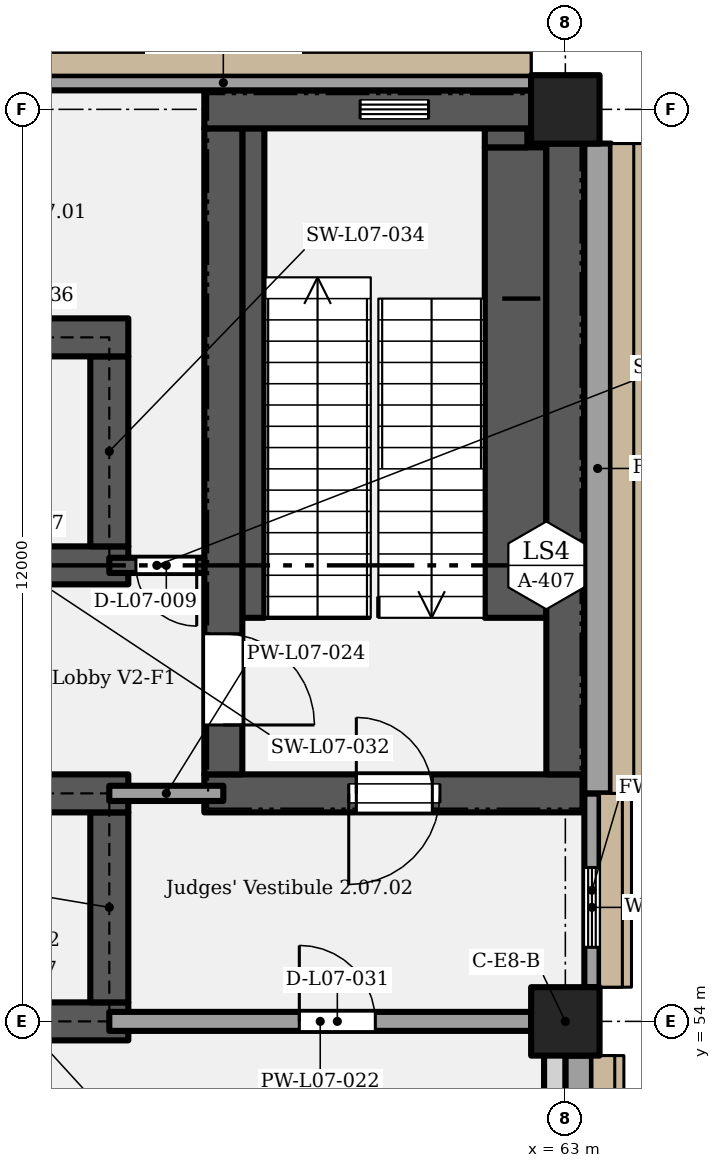
"""IFC4 building model, lengths in metres.
Left out: names, types, materials, properties, quantities, classifications, styles, units other than length and angle.
Written with IfcOpenShell. Run it as: python <this file> out.ifc"""

import sys

from ifc_helpers import new_model, si_unit, direction, frame, frame_2d, origin, origin_2d, place, context, subcontext, project, spatial, rectangle, extrude, element, fill, save


model = new_model("IFC4")
c1 = context("Model", 3, precision=1e-05, world=origin(), true_north=direction((0.0, 1.0)))
c2 = subcontext(c1, "Body", "Model", "MODEL_VIEW")
j1 = project(units=[si_unit("LENGTHUNIT", "METRE"), si_unit("PLANEANGLEUNIT", "RADIAN")], contexts=[c1])
p1 = place(None, origin())
s1 = spatial("IfcSite", under=j1, at=p1, CompositionType="ELEMENT")
p2 = place(p1, origin())
s2 = spatial("IfcBuilding", under=s1, at=p2, CompositionType="ELEMENT")
p3 = place(p2, frame((0.0, 0.0, 39.0)))
s3 = spatial("IfcBuildingStorey", under=s2, at=p3, CompositionType="ELEMENT", Elevation=39.0)
for number, where, z_axis, x_axis in (
    (1, (63.0, 54.0, 0.0), (0.0, 0.0, 1.0), (1.0, 0.0, 0.0)),
    (2, (63.0, 66.0, 0.0), (0.0, 0.0, 1.0), (1.0, 0.0, 0.0)),
):
    element("IfcColumn", number, at=place(p3, frame(where, z_axis=z_axis, x_axis=x_axis)), inside=s3, PredefinedType="COLUMN", context=c2, shape_type="SweptSolid", body=[
        extrude(rectangle(XDim=0.9, YDim=0.9, at=origin_2d()), origin(), (0.0, 0.0, 1.0), 5.4),
    ])
p4 = place(p3, frame((54.45, 54.0, 0.0), z_axis=(0.0, 0.0, 1.0), x_axis=(1.0, 0.0, 0.0)))
e3 = element("IfcWall", 3, at=p4, inside=s3, PredefinedType="SHEAR", context=c2, shape_type="SweptSolid", body=[
    extrude(rectangle(XDim=2.8, YDim=0.5, at=frame_2d((1.4, 0.0))), origin(), (0.0, 0.0, 1.0), 5.15),
])
p5 = place(p3, frame((57.0, 54.25, 0.0), z_axis=(0.0, 0.0, 1.0), x_axis=(0.0, 1.0, 0.0)))
e4 = element("IfcWall", 4, at=p5, inside=s3, PredefinedType="SHEAR", context=c2, shape_type="SweptSolid", body=[
    extrude(rectangle(XDim=2.5, YDim=0.5, at=frame_2d((1.25, 0.0))), origin(), (0.0, 0.0, 1.0), 5.15),
])
p6 = place(p3, frame((46.25, 57.0, 0.0), z_axis=(0.0, 0.0, 1.0), x_axis=(1.0, 0.0, 0.0)))
e5 = element("IfcWall", 5, at=p6, inside=s3, PredefinedType="SHEAR", context=c2, shape_type="SweptSolid", body=[
    extrude(rectangle(XDim=11.0, YDim=0.5, at=frame_2d((5.5, 0.0))), origin(), (0.0, 0.0, 1.0), 5.15),
])
p7 = place(p6, frame((4.9, 0.0, 0.0)))
e6 = element("IfcOpeningElement", 6, at=p7, cuts=e5, PredefinedType="OPENING", context=c2, shape_type="SweptSolid", body=[
    extrude(rectangle(XDim=1.2, YDim=2.1, at=frame_2d((0.6, 1.05))), frame((0.0, 0.26, 0.0), z_axis=(0.0, -1.0, 0.0), x_axis=(1.0, 0.0, 0.0)), (0.0, 0.0, 1.0), 0.52),
])
p8 = place(p3, frame((58.25, 57.0, 0.0), z_axis=(0.0, 0.0, 1.0), x_axis=(1.0, 0.0, 0.0)))
e7 = element("IfcWall", 7, at=p8, inside=s3, PredefinedType="SHEAR", context=c2, shape_type="SweptSolid", body=[
    extrude(rectangle(XDim=5.0, YDim=0.5, at=frame_2d((2.5, 0.0))), origin(), (0.0, 0.0, 1.0), 5.15),
])
p9 = place(p8, frame((2.0, 0.0, 0.0)))
e8 = element("IfcOpeningElement", 8, at=p9, cuts=e7, PredefinedType="OPENING", context=c2, shape_type="SweptSolid", body=[
    extrude(rectangle(XDim=1.0, YDim=2.1, at=frame_2d((0.5, 1.05))), frame((0.0, 0.26, 0.0), z_axis=(0.0, -1.0, 0.0), x_axis=(1.0, 0.0, 0.0)), (0.0, 0.0, 1.0), 0.52),
])
p10 = place(p3, frame((58.5, 57.25, 0.0), z_axis=(0.0, 0.0, 1.0), x_axis=(0.0, 1.0, 0.0)))
e9 = element("IfcWall", 9, at=p10, inside=s3, PredefinedType="SHEAR", context=c2, shape_type="SweptSolid", body=[
    extrude(rectangle(XDim=8.5, YDim=0.5, at=frame_2d((4.25, 0.0))), origin(), (0.0, 0.0, 1.0), 5.15),
])
p11 = place(p10, frame((1.85, 0.0, 0.0), z_axis=(0.0, 0.0, 1.0), x_axis=(-1.0, 0.0, 0.0)))
e10 = element("IfcOpeningElement", 10, at=p11, cuts=e9, PredefinedType="OPENING", context=c2, shape_type="SweptSolid", body=[
    extrude(rectangle(XDim=1.2, YDim=2.1, at=frame_2d((0.6, 1.05))), frame((0.0, 0.26, 0.0), z_axis=(0.0, -1.0, 0.0), x_axis=(1.0, 0.0, 0.0)), (0.0, 0.0, 1.0), 0.52),
])
p12 = place(p3, frame((63.0, 57.25, 0.0), z_axis=(0.0, 0.0, 1.0), x_axis=(0.0, 1.0, 0.0)))
e11 = element("IfcWall", 11, at=p12, inside=s3, PredefinedType="SHEAR", context=c2, shape_type="SweptSolid", body=[
    extrude(rectangle(XDim=8.3, YDim=0.5, at=frame_2d((4.15, 0.0))), origin(), (0.0, 0.0, 1.0), 5.15),
])
p13 = place(p3, frame((54.25, 60.0, 0.0), z_axis=(0.0, 0.0, 1.0), x_axis=(1.0, 0.0, 0.0)))
e12 = element("IfcWall", 12, at=p13, inside=s3, PredefinedType="SHEAR", context=c2, shape_type="SweptSolid", body=[
    extrude(rectangle(XDim=3.0, YDim=0.5, at=frame_2d((1.5, 0.0))), origin(), (0.0, 0.0, 1.0), 5.15),
])
p14 = place(p13, frame((0.7, 0.0, 0.0)))
e13 = element("IfcOpeningElement", 13, at=p14, cuts=e12, PredefinedType="OPENING", context=c2, shape_type="SweptSolid", body=[
    extrude(rectangle(XDim=1.1, YDim=2.1, at=frame_2d((0.55, 1.05))), frame((0.0, 0.26, 0.0), z_axis=(0.0, -1.0, 0.0), x_axis=(1.0, 0.0, 0.0)), (0.0, 0.0, 1.0), 0.52),
])
p15 = place(p3, frame((57.0, 60.25, 0.0), z_axis=(0.0, 0.0, 1.0), x_axis=(0.0, 1.0, 0.0)))
e14 = element("IfcWall", 14, at=p15, inside=s3, PredefinedType="SHEAR", context=c2, shape_type="SweptSolid", body=[
    extrude(rectangle(XDim=2.5, YDim=0.5, at=frame_2d((1.25, 0.0))), origin(), (0.0, 0.0, 1.0), 5.15),
])
p16 = place(p3, frame((54.25, 63.0, 0.0), z_axis=(0.0, 0.0, 1.0), x_axis=(1.0, 0.0, 0.0)))
e15 = element("IfcWall", 15, at=p16, inside=s3, PredefinedType="SHEAR", context=c2, shape_type="SweptSolid", body=[
    extrude(rectangle(XDim=3.0, YDim=0.5, at=frame_2d((1.5, 0.0))), origin(), (0.0, 0.0, 1.0), 5.15),
])
p17 = place(p3, frame((58.25, 66.0, 0.0), z_axis=(0.0, 0.0, 1.0), x_axis=(1.0, 0.0, 0.0)))
e16 = element("IfcWall", 16, at=p17, inside=s3, PredefinedType="SHEAR", context=c2, shape_type="SweptSolid", body=[
    extrude(rectangle(XDim=4.3, YDim=0.5, at=frame_2d((2.15, 0.0))), origin(), (0.0, 0.0, 1.0), 5.15),
])
p18 = place(p3, frame((54.45, 66.35, 0.0), z_axis=(0.0, 0.0, 1.0), x_axis=(1.0, 0.0, 0.0)))
e17 = element("IfcWall", 17, at=p18, inside=s3, PredefinedType="SOLIDWALL", context=c2, shape_type="SweptSolid", body=[
    extrude(rectangle(XDim=8.1, YDim=0.2, at=frame_2d((4.05, 0.0))), origin(), (0.0, 0.0, 1.0), 5.15),
])
p19 = place(p3, frame((63.175, 43.5, 0.0), z_axis=(0.0, 0.0, 1.0), x_axis=(0.0, 1.0, 0.0)))
e18 = element("IfcWall", 18, at=p19, inside=s3, PredefinedType="SOLIDWALL", context=c2, shape_type="SweptSolid", body=[
    extrude(rectangle(XDim=10.05, YDim=0.35, at=frame_2d((5.025, 0.0))), origin(), (0.0, 0.0, 1.0), 5.15),
])
p20 = place(p19, frame((1.575, 0.0, 1.2)))
e19 = element("IfcOpeningElement", 19, at=p20, cuts=e18, PredefinedType="OPENING", context=c2, shape_type="SweptSolid", body=[
    extrude(rectangle(XDim=1.35, YDim=3.0, at=frame_2d((0.675, 1.5))), frame((0.0, 0.185, 0.0), z_axis=(0.0, -1.0, 0.0), x_axis=(1.0, 0.0, 0.0)), (0.0, 0.0, 1.0), 0.37),
])
p21 = place(p19, frame((4.875, 0.0, 1.2)))
e20 = element("IfcOpeningElement", 20, at=p21, cuts=e18, PredefinedType="OPENING", context=c2, shape_type="SweptSolid", body=[
    extrude(rectangle(XDim=1.35, YDim=3.0, at=frame_2d((0.675, 1.5))), frame((0.0, 0.185, 0.0), z_axis=(0.0, -1.0, 0.0), x_axis=(1.0, 0.0, 0.0)), (0.0, 0.0, 1.0), 0.37),
])
p22 = place(p19, frame((8.175, 0.0, 1.2)))
e21 = element("IfcOpeningElement", 21, at=p22, cuts=e18, PredefinedType="OPENING", context=c2, shape_type="SweptSolid", body=[
    extrude(rectangle(XDim=1.35, YDim=3.0, at=frame_2d((0.675, 1.5))), frame((0.0, 0.185, 0.0), z_axis=(0.0, -1.0, 0.0), x_axis=(1.0, 0.0, 0.0)), (0.0, 0.0, 1.0), 0.37),
])
p23 = place(p3, frame((63.35, 54.45, 0.0), z_axis=(0.0, 0.0, 1.0), x_axis=(0.0, 1.0, 0.0)))
e22 = element("IfcWall", 22, at=p23, inside=s3, PredefinedType="SOLIDWALL", context=c2, shape_type="SweptSolid", body=[
    extrude(rectangle(XDim=2.55, YDim=0.2, at=frame_2d((1.275, 0.0))), origin(), (0.0, 0.0, 1.0), 5.15),
])
p24 = place(p23, frame((0.525, 0.0, 1.05)))
e23 = element("IfcOpeningElement", 23, at=p24, cuts=e22, PredefinedType="OPENING", context=c2, shape_type="SweptSolid", body=[
    extrude(rectangle(XDim=1.05, YDim=2.4, at=frame_2d((0.525, 1.2))), frame((0.0, 0.11, 0.0), z_axis=(0.0, -1.0, 0.0), x_axis=(1.0, 0.0, 0.0)), (0.0, 0.0, 1.0), 0.22),
])
p25 = place(p3, frame((63.425, 57.0, 0.0), z_axis=(0.0, 0.0, 1.0), x_axis=(0.0, 1.0, 0.0)))
e24 = element("IfcWall", 24, at=p25, inside=s3, PredefinedType="SOLIDWALL", context=c2, shape_type="SweptSolid", body=[
    extrude(rectangle(XDim=8.55, YDim=0.35, at=frame_2d((4.275, 0.0))), origin(), (0.0, 0.0, 1.0), 5.15),
])
p26 = place(p3, frame((62.86, 49.14, 5.4), z_axis=(0.0, 0.0, 1.0), x_axis=(0.0, 1.0, 0.0)))
e25 = element("IfcWall", 25, at=p26, inside=s3, PredefinedType="PARAPET", context=c2, shape_type="SweptSolid", body=[
    extrude(rectangle(XDim=5.22, YDim=0.28, at=frame_2d((2.61, 0.0))), origin(), (0.0, 0.0, 1.0), 1.6),
])
p27 = place(p3, frame((58.375, 57.0, 5.4), z_axis=(0.0, 0.0, 1.0), x_axis=(1.0, 0.0, 0.0)))
e26 = element("IfcWall", 26, at=p27, inside=s3, PredefinedType="SOLIDWALL", context=c2, shape_type="SweptSolid", body=[
    extrude(rectangle(XDim=4.75, YDim=0.25, at=frame_2d((2.375, 0.0))), origin(), (0.0, 0.0, 1.0), 3.1),
])
p28 = place(p27, frame((2.975, 0.0, 0.0), z_axis=(0.0, 0.0, 1.0), x_axis=(-1.0, 0.0, 0.0)))
e27 = element("IfcOpeningElement", 27, at=p28, cuts=e26, PredefinedType="OPENING", context=c2, shape_type="SweptSolid", body=[
    extrude(rectangle(XDim=1.2, YDim=2.1, at=frame_2d((0.6, 1.05))), frame((0.0, 0.135, 0.0), z_axis=(0.0, -1.0, 0.0), x_axis=(1.0, 0.0, 0.0)), (0.0, 0.0, 1.0), 0.27),
])
p29 = place(p3, frame((58.375, 66.0, 5.4), z_axis=(0.0, 0.0, 1.0), x_axis=(1.0, 0.0, 0.0)))
e28 = element("IfcWall", 28, at=p29, inside=s3, PredefinedType="SOLIDWALL", context=c2, shape_type="SweptSolid", body=[
    extrude(rectangle(XDim=4.75, YDim=0.25, at=frame_2d((2.375, 0.0))), origin(), (0.0, 0.0, 1.0), 3.1),
])
p30 = place(p29, frame((1.925, 0.0, 2.4)))
e29 = element("IfcOpeningElement", 29, at=p30, cuts=e28, PredefinedType="OPENING", context=c2, shape_type="SweptSolid", body=[
    extrude(rectangle(XDim=0.9, YDim=0.6, at=frame_2d((0.45, 0.3))), frame((0.0, 0.135, 0.0), z_axis=(0.0, -1.0, 0.0), x_axis=(1.0, 0.0, 0.0)), (0.0, 0.0, 1.0), 0.27),
])
for number, where, z_axis, x_axis in (
    (30, (58.5, 57.125, 5.4), (0.0, 0.0, 1.0), (0.0, 1.0, 0.0)),
    (31, (63.0, 57.125, 5.4), (0.0, 0.0, 1.0), (0.0, 1.0, 0.0)),
):
    element("IfcWall", number, at=place(p3, frame(where, z_axis=z_axis, x_axis=x_axis)), inside=s3, PredefinedType="SOLIDWALL", context=c2, shape_type="SweptSolid", body=[
        extrude(rectangle(XDim=8.75, YDim=0.25, at=frame_2d((4.375, 0.0))), origin(), (0.0, 0.0, 1.0), 3.1),
    ])
p31 = place(p3, frame((57.0, 54.0, 0.0), z_axis=(0.0, 0.0, 1.0), x_axis=(1.0, 0.0, 0.0)))
e32 = element("IfcWall", 32, at=p31, inside=s3, PredefinedType="PARTITIONING", context=c2, shape_type="SweptSolid", body=[
    extrude(rectangle(XDim=5.55, YDim=0.25, at=frame_2d((2.775, 0.0))), origin(), (0.0, 0.0, 1.0), 4.4),
])
p32 = place(p31, frame((2.5, 0.0, 0.0)))
e33 = element("IfcOpeningElement", 33, at=p32, cuts=e32, PredefinedType="OPENING", context=c2, shape_type="SweptSolid", body=[
    extrude(rectangle(XDim=1.0, YDim=2.1, at=frame_2d((0.5, 1.05))), frame((0.0, 0.135, 0.0), z_axis=(0.0, -1.0, 0.0), x_axis=(1.0, 0.0, 0.0)), (0.0, 0.0, 1.0), 0.27),
])
p33 = place(p3, frame((57.0, 57.0, 0.0), z_axis=(0.0, 0.0, 1.0), x_axis=(1.0, 0.0, 0.0)))
e34 = element("IfcWall", 34, at=p33, inside=s3, PredefinedType="PARTITIONING", context=c2, shape_type="SweptSolid", body=[
    extrude(rectangle(XDim=1.5, YDim=0.2, at=frame_2d((0.75, 0.0))), origin(), (0.0, 0.0, 1.0), 5.15),
])
p34 = place(p3, frame((57.0, 60.0, 0.0), z_axis=(0.0, 0.0, 1.0), x_axis=(1.0, 0.0, 0.0)))
e35 = element("IfcWall", 35, at=p34, inside=s3, PredefinedType="SHEAR", context=c2, shape_type="SweptSolid", body=[
    extrude(rectangle(XDim=1.25, YDim=0.2, at=frame_2d((0.625, 0.0))), origin(), (0.0, 0.0, 1.0), 5.15),
])
p35 = place(p34, frame((1.15, 0.0, 0.0), z_axis=(0.0, 0.0, 1.0), x_axis=(-1.0, 0.0, 0.0)))
e36 = element("IfcOpeningElement", 36, at=p35, cuts=e35, PredefinedType="OPENING", context=c2, shape_type="SweptSolid", body=[
    extrude(rectangle(XDim=0.8, YDim=2.0, at=frame_2d((0.4, 1.0))), frame((0.0, 0.11, 0.0), z_axis=(0.0, -1.0, 0.0), x_axis=(1.0, 0.0, 0.0)), (0.0, 0.0, 1.0), 0.22),
])
p36 = place(p3, frame((58.895, 59.31, 0.0), z_axis=(0.0, 0.0, 1.0), x_axis=(0.0, 1.0, 0.0)))
e37 = element("IfcWall", 37, at=p36, inside=s3, PredefinedType="SHEAR", context=c2, shape_type="SweptSolid", body=[
    extrude(rectangle(XDim=6.44, YDim=0.29, at=frame_2d((3.22, 0.0))), origin(), (0.0, 0.0, 1.0), 2.587),
])
p37 = place(p3, frame((62.345, 59.31, 0.0), z_axis=(0.0, 0.0, 1.0), x_axis=(0.0, 1.0, 0.0)))
e38 = element("IfcWall", 38, at=p37, inside=s3, PredefinedType="SHEAR", context=c2, shape_type="SweptSolid", body=[
    extrude(rectangle(XDim=6.19, YDim=0.81, at=frame_2d((3.095, 0.0))), origin(), (0.0, 0.0, 1.0), 2.587),
])
p38 = place(p3, frame((62.22, 65.5, 0.0), z_axis=(0.0, 0.0, 1.0), x_axis=(0.0, 1.0, 0.0)))
e39 = element("IfcWall", 39, at=p38, inside=s3, PredefinedType="SHEAR", context=c2, shape_type="SweptSolid", body=[
    extrude(rectangle(XDim=0.25, YDim=0.56, at=frame_2d((0.125, 0.0))), origin(), (0.0, 0.0, 1.0), 2.587),
])
p39 = place(p24, origin())
e40 = element("IfcWindow", 40, at=p39, inside=s3, PartitioningType="SINGLE_PANEL", PredefinedType="WINDOW", context=c2, shape_type="SweptSolid", body=[
    extrude(rectangle(XDim=1.05, YDim=2.4, at=frame_2d((0.525, 1.2))), frame((0.0, 0.03, 0.0), z_axis=(0.0, -1.0, 0.0), x_axis=(1.0, 0.0, 0.0)), (0.0, 0.0, 1.0), 0.06),
])
fill(e23, e40)
p40 = place(p28, origin())
e41 = element("IfcDoor", 41, at=p40, inside=s3, OperationType="SINGLE_SWING_LEFT", PredefinedType="DOOR", context=c2, shape_type="SweptSolid", body=[
    extrude(rectangle(XDim=1.2, YDim=2.1, at=frame_2d((0.6, 1.05))), frame((0.0, 0.025, 0.0), z_axis=(0.0, -1.0, 0.0), x_axis=(1.0, 0.0, 0.0)), (0.0, 0.0, 1.0), 0.05),
])
fill(e27, e41)
p41 = place(p30, origin())
e42 = element("IfcWindow", 42, at=p41, inside=s3, PartitioningType="SINGLE_PANEL", PredefinedType="WINDOW", context=c2, shape_type="SweptSolid", body=[
    extrude(rectangle(XDim=0.9, YDim=0.6, at=frame_2d((0.45, 0.3))), frame((0.0, 0.03, 0.0), z_axis=(0.0, -1.0, 0.0), x_axis=(1.0, 0.0, 0.0)), (0.0, 0.0, 1.0), 0.06),
])
fill(e29, e42)
p42 = place(p11, origin())
e43 = element("IfcDoor", 43, at=p42, inside=s3, OperationType="SINGLE_SWING_RIGHT", PredefinedType="DOOR", context=c2, shape_type="SweptSolid", body=[
    extrude(rectangle(XDim=1.2, YDim=2.1, at=frame_2d((0.6, 1.05))), frame((0.0, 0.025, 0.0), z_axis=(0.0, -1.0, 0.0), x_axis=(1.0, 0.0, 0.0)), (0.0, 0.0, 1.0), 0.05),
])
fill(e10, e43)
p43 = place(p35, origin())
e44 = element("IfcDoor", 44, at=p43, inside=s3, OperationType="SINGLE_SWING_LEFT", PredefinedType="DOOR", context=c2, shape_type="SweptSolid", body=[
    extrude(rectangle(XDim=0.8, YDim=2.0, at=frame_2d((0.4, 1.0))), frame((0.0, 0.025, 0.0), z_axis=(0.0, -1.0, 0.0), x_axis=(1.0, 0.0, 0.0)), (0.0, 0.0, 1.0), 0.05),
])
fill(e36, e44)
p44 = place(p9, origin())
e45 = element("IfcDoor", 45, at=p44, inside=s3, OperationType="SINGLE_SWING_LEFT", PredefinedType="DOOR", context=c2, shape_type="SweptSolid", body=[
    extrude(rectangle(XDim=1.0, YDim=2.1, at=frame_2d((0.5, 1.05))), frame((0.0, 0.025, 0.0), z_axis=(0.0, -1.0, 0.0), x_axis=(1.0, 0.0, 0.0)), (0.0, 0.0, 1.0), 0.05),
])
fill(e8, e45)
p45 = place(p32, origin())
e46 = element("IfcDoor", 46, at=p45, inside=s3, OperationType="SINGLE_SWING_LEFT", PredefinedType="DOOR", context=c2, shape_type="SweptSolid", body=[
    extrude(rectangle(XDim=1.0, YDim=2.1, at=frame_2d((0.5, 1.05))), frame((0.0, 0.025, 0.0), z_axis=(0.0, -1.0, 0.0), x_axis=(1.0, 0.0, 0.0)), (0.0, 0.0, 1.0), 0.05),
])
fill(e33, e46)
save(model, sys.argv[1])
